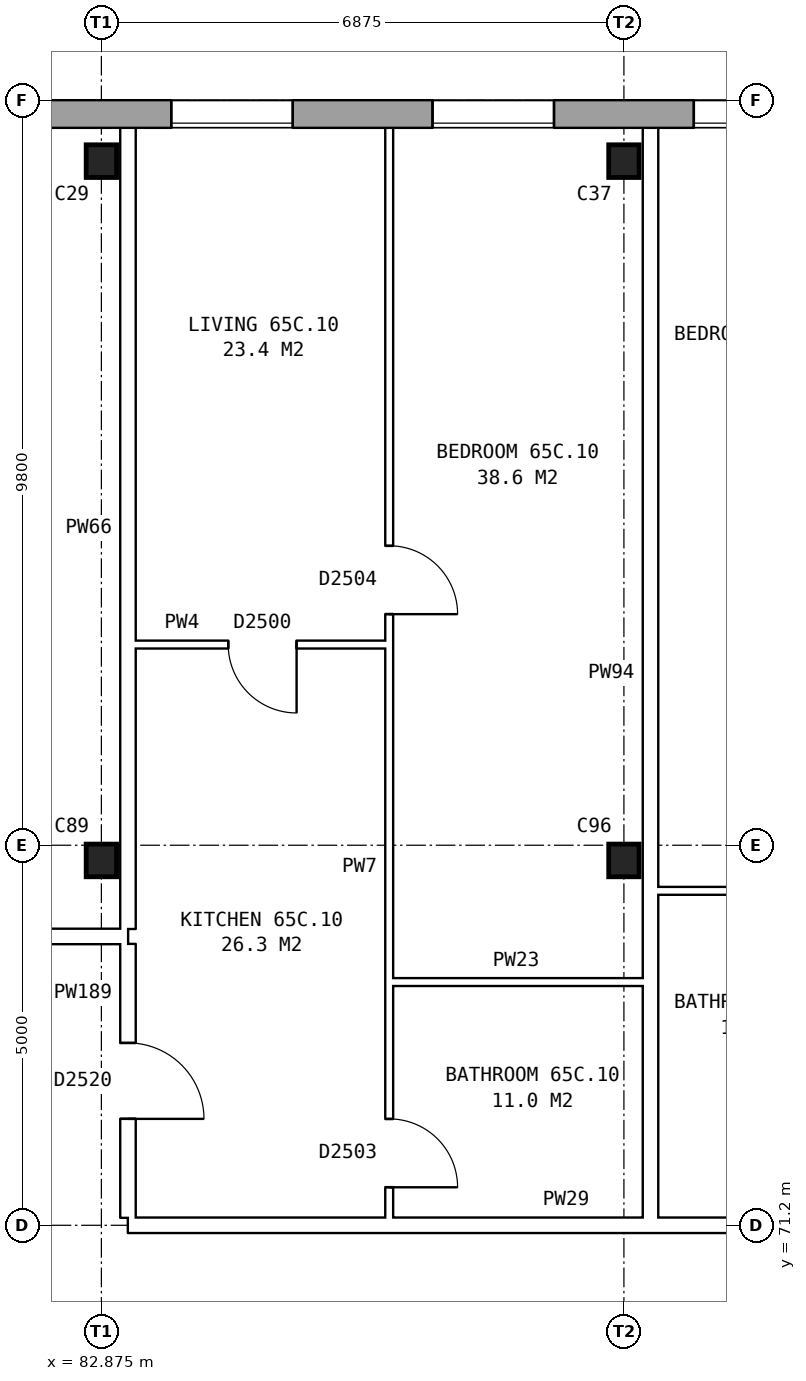
"""IFC4 building model, lengths in metres.
Left out: names, types, materials, properties, quantities, classifications, styles, units other than length and angle.
Written with IfcOpenShell. Run it as: python <this file> out.ifc"""

import sys

from ifc_helpers import new_model, si_unit, direction, frame, frame_2d, origin, origin_2d, place, context, subcontext, project, spatial, rectangle, i_section, extrude, element, fill, save


model = new_model("IFC4")
c1 = context("Model", 3, precision=1e-05, world=origin(), true_north=direction((0.0, 1.0)))
c2 = subcontext(c1, "Body", "Model", "MODEL_VIEW")
j1 = project(units=[si_unit("LENGTHUNIT", "METRE"), si_unit("PLANEANGLEUNIT", "RADIAN")], contexts=[c1])
p1 = place(None, origin())
s1 = spatial("IfcSite", under=j1, at=p1, CompositionType="ELEMENT")
p2 = place(p1, origin())
s2 = spatial("IfcBuilding", under=s1, at=p2, CompositionType="ELEMENT")
p3 = place(p2, frame((0.0, 0.0, 230.7)))
s3 = spatial("IfcBuildingStorey", under=s2, at=p3, CompositionType="ELEMENT", Elevation=230.7)
for number, where, z_axis, x_axis in (
    (1, (82.875, 76.0, 0.0), (0.0, 0.0, 1.0), (1.0, 0.0, 0.0)),
    (2, (89.75, 76.0, 0.0), (0.0, 0.0, 1.0), (1.0, 0.0, 0.0)),
    (3, (82.875, 85.2, 0.0), (0.0, 0.0, 1.0), (1.0, 0.0, 0.0)),
    (4, (89.75, 85.2, 0.0), (0.0, 0.0, 1.0), (1.0, 0.0, 0.0)),
):
    element("IfcColumn", number, at=place(p3, frame(where, z_axis=z_axis, x_axis=x_axis)), inside=s3, PredefinedType="COLUMN", context=c2, shape_type="SweptSolid", body=[
        extrude(i_section(OverallWidth=0.4, OverallDepth=0.43, WebThickness=0.028, FlangeThickness=0.04, at=origin_2d()), origin(), (0.0, 0.0, 1.0), 2.85),
    ])
p4 = place(p3, frame((131.05, 85.82, 0.0), z_axis=(0.0, 0.0, 1.0), x_axis=(-1.0, 0.0, 0.0)))
e5 = element("IfcWall", 5, at=p4, inside=s3, PredefinedType="STANDARD", context=c2, shape_type="SweptSolid", body=[
    extrude(rectangle(XDim=55.1, YDim=0.36, at=frame_2d((27.55, 0.0))), origin(), (0.0, 0.0, 1.0), 2.85),
])
p5 = place(p4, frame((0.969, 0.0, 0.8)))
e6 = element("IfcOpeningElement", 6, at=p5, cuts=e5, PredefinedType="OPENING", context=c2, shape_type="SweptSolid", body=[
    extrude(rectangle(XDim=1.6, YDim=1.8, at=frame_2d((0.8, 0.9))), frame((0.0, 0.19, 0.0), z_axis=(0.0, -1.0, 0.0), x_axis=(1.0, 0.0, 0.0)), (0.0, 0.0, 1.0), 0.38),
])
p6 = place(p4, frame((4.406, 0.0, 0.8)))
e7 = element("IfcOpeningElement", 7, at=p6, cuts=e5, PredefinedType="OPENING", context=c2, shape_type="SweptSolid", body=[
    extrude(rectangle(XDim=1.6, YDim=1.8, at=frame_2d((0.8, 0.9))), frame((0.0, 0.19, 0.0), z_axis=(0.0, -1.0, 0.0), x_axis=(1.0, 0.0, 0.0)), (0.0, 0.0, 1.0), 0.38),
])
p7 = place(p4, frame((7.844, 0.0, 0.8)))
e8 = element("IfcOpeningElement", 8, at=p7, cuts=e5, PredefinedType="OPENING", context=c2, shape_type="SweptSolid", body=[
    extrude(rectangle(XDim=1.6, YDim=1.8, at=frame_2d((0.8, 0.9))), frame((0.0, 0.19, 0.0), z_axis=(0.0, -1.0, 0.0), x_axis=(1.0, 0.0, 0.0)), (0.0, 0.0, 1.0), 0.38),
])
p8 = place(p4, frame((11.281, 0.0, 0.8)))
e9 = element("IfcOpeningElement", 9, at=p8, cuts=e5, PredefinedType="OPENING", context=c2, shape_type="SweptSolid", body=[
    extrude(rectangle(XDim=1.6, YDim=1.8, at=frame_2d((0.8, 0.9))), frame((0.0, 0.19, 0.0), z_axis=(0.0, -1.0, 0.0), x_axis=(1.0, 0.0, 0.0)), (0.0, 0.0, 1.0), 0.38),
])
p9 = place(p4, frame((14.719, 0.0, 0.8)))
e10 = element("IfcOpeningElement", 10, at=p9, cuts=e5, PredefinedType="OPENING", context=c2, shape_type="SweptSolid", body=[
    extrude(rectangle(XDim=1.6, YDim=1.8, at=frame_2d((0.8, 0.9))), frame((0.0, 0.19, 0.0), z_axis=(0.0, -1.0, 0.0), x_axis=(1.0, 0.0, 0.0)), (0.0, 0.0, 1.0), 0.38),
])
p10 = place(p4, frame((18.156, 0.0, 0.8)))
e11 = element("IfcOpeningElement", 11, at=p10, cuts=e5, PredefinedType="OPENING", context=c2, shape_type="SweptSolid", body=[
    extrude(rectangle(XDim=1.6, YDim=1.8, at=frame_2d((0.8, 0.9))), frame((0.0, 0.19, 0.0), z_axis=(0.0, -1.0, 0.0), x_axis=(1.0, 0.0, 0.0)), (0.0, 0.0, 1.0), 0.38),
])
p11 = place(p4, frame((21.594, 0.0, 0.8)))
e12 = element("IfcOpeningElement", 12, at=p11, cuts=e5, PredefinedType="OPENING", context=c2, shape_type="SweptSolid", body=[
    extrude(rectangle(XDim=1.6, YDim=1.8, at=frame_2d((0.8, 0.9))), frame((0.0, 0.19, 0.0), z_axis=(0.0, -1.0, 0.0), x_axis=(1.0, 0.0, 0.0)), (0.0, 0.0, 1.0), 0.38),
])
p12 = place(p4, frame((25.031, 0.0, 0.8)))
e13 = element("IfcOpeningElement", 13, at=p12, cuts=e5, PredefinedType="OPENING", context=c2, shape_type="SweptSolid", body=[
    extrude(rectangle(XDim=1.6, YDim=1.8, at=frame_2d((0.8, 0.9))), frame((0.0, 0.19, 0.0), z_axis=(0.0, -1.0, 0.0), x_axis=(1.0, 0.0, 0.0)), (0.0, 0.0, 1.0), 0.38),
])
p13 = place(p4, frame((28.469, 0.0, 0.8)))
e14 = element("IfcOpeningElement", 14, at=p13, cuts=e5, PredefinedType="OPENING", context=c2, shape_type="SweptSolid", body=[
    extrude(rectangle(XDim=1.6, YDim=1.8, at=frame_2d((0.8, 0.9))), frame((0.0, 0.19, 0.0), z_axis=(0.0, -1.0, 0.0), x_axis=(1.0, 0.0, 0.0)), (0.0, 0.0, 1.0), 0.38),
])
p14 = place(p4, frame((31.906, 0.0, 0.8)))
e15 = element("IfcOpeningElement", 15, at=p14, cuts=e5, PredefinedType="OPENING", context=c2, shape_type="SweptSolid", body=[
    extrude(rectangle(XDim=1.6, YDim=1.8, at=frame_2d((0.8, 0.9))), frame((0.0, 0.19, 0.0), z_axis=(0.0, -1.0, 0.0), x_axis=(1.0, 0.0, 0.0)), (0.0, 0.0, 1.0), 0.38),
])
p15 = place(p4, frame((35.344, 0.0, 0.8)))
e16 = element("IfcOpeningElement", 16, at=p15, cuts=e5, PredefinedType="OPENING", context=c2, shape_type="SweptSolid", body=[
    extrude(rectangle(XDim=1.6, YDim=1.8, at=frame_2d((0.8, 0.9))), frame((0.0, 0.19, 0.0), z_axis=(0.0, -1.0, 0.0), x_axis=(1.0, 0.0, 0.0)), (0.0, 0.0, 1.0), 0.38),
])
p16 = place(p4, frame((38.781, 0.0, 0.8)))
e17 = element("IfcOpeningElement", 17, at=p16, cuts=e5, PredefinedType="OPENING", context=c2, shape_type="SweptSolid", body=[
    extrude(rectangle(XDim=1.6, YDim=1.8, at=frame_2d((0.8, 0.9))), frame((0.0, 0.19, 0.0), z_axis=(0.0, -1.0, 0.0), x_axis=(1.0, 0.0, 0.0)), (0.0, 0.0, 1.0), 0.38),
])
p17 = place(p4, frame((42.219, 0.0, 0.8)))
e18 = element("IfcOpeningElement", 18, at=p17, cuts=e5, PredefinedType="OPENING", context=c2, shape_type="SweptSolid", body=[
    extrude(rectangle(XDim=1.6, YDim=1.8, at=frame_2d((0.8, 0.9))), frame((0.0, 0.19, 0.0), z_axis=(0.0, -1.0, 0.0), x_axis=(1.0, 0.0, 0.0)), (0.0, 0.0, 1.0), 0.38),
])
p18 = place(p4, frame((45.656, 0.0, 0.8)))
e19 = element("IfcOpeningElement", 19, at=p18, cuts=e5, PredefinedType="OPENING", context=c2, shape_type="SweptSolid", body=[
    extrude(rectangle(XDim=1.6, YDim=1.8, at=frame_2d((0.8, 0.9))), frame((0.0, 0.19, 0.0), z_axis=(0.0, -1.0, 0.0), x_axis=(1.0, 0.0, 0.0)), (0.0, 0.0, 1.0), 0.38),
])
p19 = place(p4, frame((49.094, 0.0, 0.8)))
e20 = element("IfcOpeningElement", 20, at=p19, cuts=e5, PredefinedType="OPENING", context=c2, shape_type="SweptSolid", body=[
    extrude(rectangle(XDim=1.6, YDim=1.8, at=frame_2d((0.8, 0.9))), frame((0.0, 0.19, 0.0), z_axis=(0.0, -1.0, 0.0), x_axis=(1.0, 0.0, 0.0)), (0.0, 0.0, 1.0), 0.38),
])
p20 = place(p4, frame((52.531, 0.0, 0.8)))
e21 = element("IfcOpeningElement", 21, at=p20, cuts=e5, PredefinedType="OPENING", context=c2, shape_type="SweptSolid", body=[
    extrude(rectangle(XDim=1.6, YDim=1.8, at=frame_2d((0.8, 0.9))), frame((0.0, 0.19, 0.0), z_axis=(0.0, -1.0, 0.0), x_axis=(1.0, 0.0, 0.0)), (0.0, 0.0, 1.0), 0.38),
])
p21 = place(p3, frame((83.225, 71.2, 0.0), z_axis=(0.0, 0.0, 1.0), x_axis=(1.0, 0.0, 0.0)))
e22 = element("IfcWall", 22, at=p21, inside=s3, PredefinedType="PARTITIONING", context=c2, shape_type="SweptSolid", body=[
    extrude(rectangle(XDim=41.25, YDim=0.2, at=frame_2d((20.625, 0.0))), origin(), (0.0, 0.0, 1.0), 2.85),
])
p22 = place(p21, frame((11.531, 0.0, 0.0)))
e23 = element("IfcOpeningElement", 23, at=p22, cuts=e22, PredefinedType="OPENING", context=c2, shape_type="SweptSolid", body=[
    extrude(rectangle(XDim=1.0, YDim=2.1, at=frame_2d((0.5, 1.05))), frame((0.0, 0.11, 0.0), z_axis=(0.0, -1.0, 0.0), x_axis=(1.0, 0.0, 0.0)), (0.0, 0.0, 1.0), 0.22),
])
p23 = place(p21, frame((21.844, 0.0, 0.0)))
e24 = element("IfcOpeningElement", 24, at=p23, cuts=e22, PredefinedType="OPENING", context=c2, shape_type="SweptSolid", body=[
    extrude(rectangle(XDim=1.0, YDim=2.1, at=frame_2d((0.5, 1.05))), frame((0.0, 0.11, 0.0), z_axis=(0.0, -1.0, 0.0), x_axis=(1.0, 0.0, 0.0)), (0.0, 0.0, 1.0), 0.22),
])
p24 = place(p21, frame((32.156, 0.0, 0.0)))
e25 = element("IfcOpeningElement", 25, at=p24, cuts=e22, PredefinedType="OPENING", context=c2, shape_type="SweptSolid", body=[
    extrude(rectangle(XDim=1.0, YDim=2.1, at=frame_2d((0.5, 1.05))), frame((0.0, 0.11, 0.0), z_axis=(0.0, -1.0, 0.0), x_axis=(1.0, 0.0, 0.0)), (0.0, 0.0, 1.0), 0.22),
])
p25 = place(p3, frame((86.662, 74.4, 0.0), z_axis=(0.0, 0.0, 1.0), x_axis=(1.0, 0.0, 0.0)))
e26 = element("IfcWall", 26, at=p25, inside=s3, PredefinedType="PARTITIONING", context=c2, shape_type="SweptSolid", body=[
    extrude(rectangle(XDim=3.338, YDim=0.1, at=frame_2d((1.669, 0.0))), origin(), (0.0, 0.0, 1.0), 2.85),
])
p26 = place(p3, frame((75.64, 75.0, 0.0), z_axis=(0.0, 0.0, 1.0), x_axis=(1.0, 0.0, 0.0)))
e27 = element("IfcWall", 27, at=p26, inside=s3, PredefinedType="PARTITIONING", context=c2, shape_type="SweptSolid", body=[
    extrude(rectangle(XDim=7.585, YDim=0.2, at=frame_2d((3.792, 0.0))), origin(), (0.0, 0.0, 1.0), 2.85),
])
p27 = place(p26, frame((3.343, 0.0, 0.0)))
e28 = element("IfcOpeningElement", 28, at=p27, cuts=e27, PredefinedType="OPENING", context=c2, shape_type="SweptSolid", body=[
    extrude(rectangle(XDim=0.9, YDim=2.1, at=frame_2d((0.45, 1.05))), frame((0.0, 0.11, 0.0), z_axis=(0.0, -1.0, 0.0), x_axis=(1.0, 0.0, 0.0)), (0.0, 0.0, 1.0), 0.22),
])
p28 = place(p3, frame((90.2, 75.6, 0.0), z_axis=(0.0, 0.0, 1.0), x_axis=(1.0, 0.0, 0.0)))
e29 = element("IfcWall", 29, at=p28, inside=s3, PredefinedType="PARTITIONING", context=c2, shape_type="SweptSolid", body=[
    extrude(rectangle(XDim=3.337, YDim=0.1, at=frame_2d((1.668, 0.0))), origin(), (0.0, 0.0, 1.0), 2.85),
])
p29 = place(p3, frame((83.325, 78.84, 0.0), z_axis=(0.0, 0.0, 1.0), x_axis=(1.0, 0.0, 0.0)))
e30 = element("IfcWall", 30, at=p29, inside=s3, PredefinedType="PARTITIONING", context=c2, shape_type="SweptSolid", body=[
    extrude(rectangle(XDim=3.337, YDim=0.1, at=frame_2d((1.668, 0.0))), origin(), (0.0, 0.0, 1.0), 2.85),
])
p30 = place(p29, frame((1.219, 0.0, 0.0)))
e31 = element("IfcOpeningElement", 31, at=p30, cuts=e30, PredefinedType="OPENING", context=c2, shape_type="SweptSolid", body=[
    extrude(rectangle(XDim=0.9, YDim=2.1, at=frame_2d((0.45, 1.05))), frame((0.0, 0.06, 0.0), z_axis=(0.0, -1.0, 0.0), x_axis=(1.0, 0.0, 0.0)), (0.0, 0.0, 1.0), 0.12),
])
p31 = place(p3, frame((83.225, 71.3, 0.0), z_axis=(0.0, 0.0, 1.0), x_axis=(0.0, 1.0, 0.0)))
e32 = element("IfcWall", 32, at=p31, inside=s3, PredefinedType="PARTITIONING", context=c2, shape_type="SweptSolid", body=[
    extrude(rectangle(XDim=3.6, YDim=0.2, at=frame_2d((1.8, 0.0))), origin(), (0.0, 0.0, 1.0), 2.85),
])
p32 = place(p31, frame((1.3, 0.0, 0.0)))
e33 = element("IfcOpeningElement", 33, at=p32, cuts=e32, PredefinedType="OPENING", context=c2, shape_type="SweptSolid", body=[
    extrude(rectangle(XDim=1.0, YDim=2.1, at=frame_2d((0.5, 1.05))), frame((0.0, 0.11, 0.0), z_axis=(0.0, -1.0, 0.0), x_axis=(1.0, 0.0, 0.0)), (0.0, 0.0, 1.0), 0.22),
])
p33 = place(p3, frame((83.225, 75.1, 0.0), z_axis=(0.0, 0.0, 1.0), x_axis=(0.0, 1.0, 0.0)))
e34 = element("IfcWall", 34, at=p33, inside=s3, PredefinedType="PARTITIONING", context=c2, shape_type="SweptSolid", body=[
    extrude(rectangle(XDim=10.54, YDim=0.2, at=frame_2d((5.27, 0.0))), origin(), (0.0, 0.0, 1.0), 2.85),
])
p34 = place(p3, frame((86.662, 71.3, 0.0), z_axis=(0.0, 0.0, 1.0), x_axis=(0.0, 1.0, 0.0)))
e35 = element("IfcWall", 35, at=p34, inside=s3, PredefinedType="PARTITIONING", context=c2, shape_type="SweptSolid", body=[
    extrude(rectangle(XDim=14.34, YDim=0.1, at=frame_2d((7.17, 0.0))), origin(), (0.0, 0.0, 1.0), 2.85),
])
p35 = place(p34, frame((7.94, 0.0, 0.0)))
e36 = element("IfcOpeningElement", 36, at=p35, cuts=e35, PredefinedType="OPENING", context=c2, shape_type="SweptSolid", body=[
    extrude(rectangle(XDim=0.9, YDim=2.1, at=frame_2d((0.45, 1.05))), frame((0.0, 0.06, 0.0), z_axis=(0.0, -1.0, 0.0), x_axis=(1.0, 0.0, 0.0)), (0.0, 0.0, 1.0), 0.12),
])
p36 = place(p34, frame((0.4, 0.0, 0.0)))
e37 = element("IfcOpeningElement", 37, at=p36, cuts=e35, PredefinedType="OPENING", context=c2, shape_type="SweptSolid", body=[
    extrude(rectangle(XDim=0.9, YDim=2.1, at=frame_2d((0.45, 1.05))), frame((0.0, 0.06, 0.0), z_axis=(0.0, -1.0, 0.0), x_axis=(1.0, 0.0, 0.0)), (0.0, 0.0, 1.0), 0.12),
])
p37 = place(p3, frame((90.1, 71.3, 0.0), z_axis=(0.0, 0.0, 1.0), x_axis=(0.0, 1.0, 0.0)))
e38 = element("IfcWall", 38, at=p37, inside=s3, PredefinedType="PARTITIONING", context=c2, shape_type="SweptSolid", body=[
    extrude(rectangle(XDim=14.34, YDim=0.2, at=frame_2d((7.17, 0.0))), origin(), (0.0, 0.0, 1.0), 2.85),
])
p38 = place(p16, origin())
e39 = element("IfcWindow", 39, at=p38, inside=s3, PartitioningType="SINGLE_PANEL", PredefinedType="WINDOW", context=c2, shape_type="SweptSolid", body=[
    extrude(rectangle(XDim=1.6, YDim=1.8, at=frame_2d((0.8, 0.9))), frame((0.0, 0.15, 0.0), z_axis=(0.0, -1.0, 0.0), x_axis=(1.0, 0.0, 0.0)), (0.0, 0.0, 1.0), 0.06),
])
fill(e17, e39)
p39 = place(p17, origin())
e40 = element("IfcWindow", 40, at=p39, inside=s3, PartitioningType="SINGLE_PANEL", PredefinedType="WINDOW", context=c2, shape_type="SweptSolid", body=[
    extrude(rectangle(XDim=1.6, YDim=1.8, at=frame_2d((0.8, 0.9))), frame((0.0, 0.15, 0.0), z_axis=(0.0, -1.0, 0.0), x_axis=(1.0, 0.0, 0.0)), (0.0, 0.0, 1.0), 0.06),
])
fill(e18, e40)
p40 = place(p18, origin())
e41 = element("IfcWindow", 41, at=p40, inside=s3, PartitioningType="SINGLE_PANEL", PredefinedType="WINDOW", context=c2, shape_type="SweptSolid", body=[
    extrude(rectangle(XDim=1.6, YDim=1.8, at=frame_2d((0.8, 0.9))), frame((0.0, 0.15, 0.0), z_axis=(0.0, -1.0, 0.0), x_axis=(1.0, 0.0, 0.0)), (0.0, 0.0, 1.0), 0.06),
])
fill(e19, e41)
p41 = place(p35, frame((0.9, 0.0, 0.0), z_axis=(0.0, 0.0, 1.0), x_axis=(-1.0, 0.0, 0.0)))
e42 = element("IfcDoor", 42, at=p41, inside=s3, OperationType="SINGLE_SWING_RIGHT", PredefinedType="DOOR", context=c2, shape_type="SweptSolid", body=[
    extrude(rectangle(XDim=0.9, YDim=2.1, at=frame_2d((0.45, 1.05))), frame((0.0, 0.025, 0.0), z_axis=(0.0, -1.0, 0.0), x_axis=(1.0, 0.0, 0.0)), (0.0, 0.0, 1.0), 0.05),
])
fill(e36, e42)
p42 = place(p32, frame((1.0, 0.0, 0.0), z_axis=(0.0, 0.0, 1.0), x_axis=(-1.0, 0.0, 0.0)))
e43 = element("IfcDoor", 43, at=p42, inside=s3, OperationType="SINGLE_SWING_RIGHT", PredefinedType="DOOR", context=c2, shape_type="SweptSolid", body=[
    extrude(rectangle(XDim=1.0, YDim=2.1, at=frame_2d((0.5, 1.05))), frame((0.0, 0.025, 0.0), z_axis=(0.0, -1.0, 0.0), x_axis=(1.0, 0.0, 0.0)), (0.0, 0.0, 1.0), 0.05),
])
fill(e33, e43)
p43 = place(p30, frame((0.9, 0.0, 0.0), z_axis=(0.0, 0.0, 1.0), x_axis=(-1.0, 0.0, 0.0)))
e44 = element("IfcDoor", 44, at=p43, inside=s3, OperationType="SINGLE_SWING_LEFT", PredefinedType="DOOR", context=c2, shape_type="SweptSolid", body=[
    extrude(rectangle(XDim=0.9, YDim=2.1, at=frame_2d((0.45, 1.05))), frame((0.0, 0.025, 0.0), z_axis=(0.0, -1.0, 0.0), x_axis=(1.0, 0.0, 0.0)), (0.0, 0.0, 1.0), 0.05),
])
fill(e31, e44)
p44 = place(p36, frame((0.9, 0.0, 0.0), z_axis=(0.0, 0.0, 1.0), x_axis=(-1.0, 0.0, 0.0)))
e45 = element("IfcDoor", 45, at=p44, inside=s3, OperationType="SINGLE_SWING_RIGHT", PredefinedType="DOOR", context=c2, shape_type="SweptSolid", body=[
    extrude(rectangle(XDim=0.9, YDim=2.1, at=frame_2d((0.45, 1.05))), frame((0.0, 0.025, 0.0), z_axis=(0.0, -1.0, 0.0), x_axis=(1.0, 0.0, 0.0)), (0.0, 0.0, 1.0), 0.05),
])
fill(e37, e45)
save(model, sys.argv[1])
